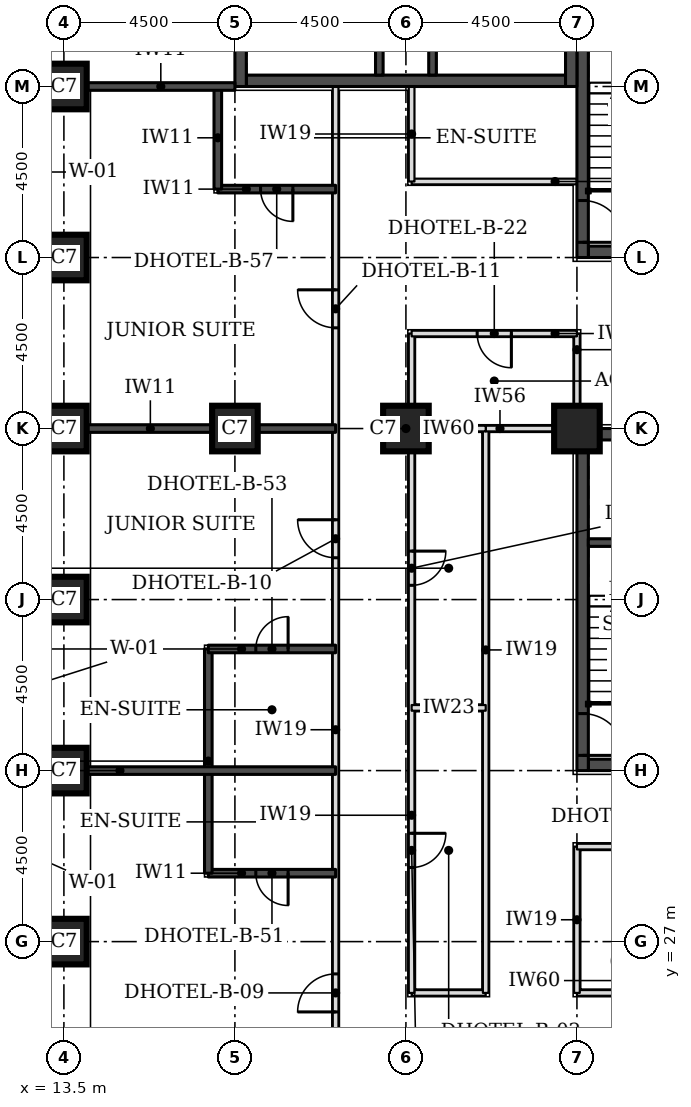
"""IFC4 building model, lengths in metres.
Left out: names, types, materials, properties, quantities, classifications, styles, units other than length and angle.
Written with IfcOpenShell. Run it as: python <this file> out.ifc"""

import sys

from ifc_helpers import new_model, si_unit, direction, frame, frame_2d, origin, origin_2d, place, context, subcontext, project, spatial, rectangle, extrude, element, fill, save


model = new_model("IFC4")
c1 = context("Model", 3, precision=1e-05, world=origin(), true_north=direction((0.0, 1.0)))
c2 = subcontext(c1, "Body", "Model", "MODEL_VIEW")
j1 = project(units=[si_unit("LENGTHUNIT", "METRE"), si_unit("PLANEANGLEUNIT", "RADIAN")], contexts=[c1])
p1 = place(None, origin())
s1 = spatial("IfcSite", under=j1, at=p1, CompositionType="ELEMENT")
p2 = place(p1, origin())
s2 = spatial("IfcBuilding", under=s1, at=p2, CompositionType="ELEMENT")
p3 = place(p2, frame((0.0, 0.0, 52.8)))
s3 = spatial("IfcBuildingStorey", under=s2, at=p3, CompositionType="ELEMENT", Elevation=52.8)
for number, where, z_axis, x_axis in (
    (1, (13.5, 27.0, 0.0), (0.0, 0.0, 1.0), (1.0, 0.0, 0.0)),
    (2, (13.5, 31.5, 0.0), (0.0, 0.0, 1.0), (1.0, 0.0, 0.0)),
    (3, (13.5, 36.0, 0.0), (0.0, 0.0, 1.0), (1.0, 0.0, 0.0)),
    (4, (13.5, 40.5, 0.0), (0.0, 0.0, 1.0), (1.0, 0.0, 0.0)),
    (5, (18.0, 40.5, 0.0), (0.0, 0.0, 1.0), (1.0, 0.0, 0.0)),
    (6, (22.5, 40.5, 0.0), (0.0, 0.0, 1.0), (1.0, 0.0, 0.0)),
    (7, (27.0, 40.5, 0.0), (0.0, 0.0, 1.0), (1.0, 0.0, 0.0)),
    (8, (13.5, 45.0, 0.0), (0.0, 0.0, 1.0), (1.0, 0.0, 0.0)),
    (9, (13.5, 49.5, 0.0), (0.0, 0.0, 1.0), (1.0, 0.0, 0.0)),
):
    element("IfcColumn", number, at=place(p3, frame(where, z_axis=z_axis, x_axis=x_axis)), inside=s3, PredefinedType="COLUMN", context=c2, shape_type="SweptSolid", body=[
        extrude(rectangle(XDim=1.2, YDim=1.2, at=origin_2d()), origin(), (0.0, 0.0, 1.0), 3.3),
    ])
p4 = place(p3, frame((27.3, 45.15, 0.0), z_axis=(0.0, 0.0, 1.0), x_axis=(1.0, 0.0, 0.0)))
e10 = element("IfcWall", 10, at=p4, inside=s3, PredefinedType="SHEAR", context=c2, shape_type="SweptSolid", body=[
    extrude(rectangle(XDim=8.4, YDim=0.3, at=frame_2d((4.2, 0.0))), origin(), (0.0, 0.0, 1.0), 3.3),
])
p5 = place(p4, frame((5.2, 0.0, 0.0)))
e11 = element("IfcOpeningElement", 11, at=p5, cuts=e10, PredefinedType="OPENING", context=c2, shape_type="SweptSolid", body=[
    extrude(rectangle(XDim=1.0, YDim=2.1, at=frame_2d((0.5, 1.05))), frame((0.0, 0.16, 0.0), z_axis=(0.0, -1.0, 0.0), x_axis=(1.0, 0.0, 0.0)), (0.0, 0.0, 1.0), 0.32),
])
p6 = place(p3, frame((27.15, 45.0, 0.0), z_axis=(0.0, 0.0, 1.0), x_axis=(0.0, 1.0, 0.0)))
e12 = element("IfcWall", 12, at=p6, inside=s3, PredefinedType="SHEAR", context=c2, shape_type="SweptSolid", body=[
    extrude(rectangle(XDim=9.0, YDim=0.3, at=frame_2d((4.5, 0.0))), origin(), (0.0, 0.0, 1.0), 3.3),
])
p7 = place(p6, frame((0.4, 0.0, 0.0)))
e13 = element("IfcOpeningElement", 13, at=p7, cuts=e12, PredefinedType="OPENING", context=c2, shape_type="SweptSolid", body=[
    extrude(rectangle(XDim=1.1, YDim=2.1, at=frame_2d((0.55, 1.05))), frame((0.0, 0.16, 0.0), z_axis=(0.0, -1.0, 0.0), x_axis=(1.0, 0.0, 0.0)), (0.0, 0.0, 1.0), 0.32),
])
p8 = place(p3, frame((27.3, 31.65, 0.0), z_axis=(0.0, 0.0, 1.0), x_axis=(1.0, 0.0, 0.0)))
e14 = element("IfcWall", 14, at=p8, inside=s3, PredefinedType="SHEAR", context=c2, shape_type="SweptSolid", body=[
    extrude(rectangle(XDim=8.4, YDim=0.3, at=frame_2d((4.2, 0.0))), origin(), (0.0, 0.0, 1.0), 3.3),
])
p9 = place(p8, frame((4.8, 0.0, 0.0)))
e15 = element("IfcOpeningElement", 15, at=p9, cuts=e14, PredefinedType="OPENING", context=c2, shape_type="SweptSolid", body=[
    extrude(rectangle(XDim=1.8, YDim=2.1, at=frame_2d((0.9, 1.05))), frame((0.0, 0.16, 0.0), z_axis=(0.0, -1.0, 0.0), x_axis=(1.0, 0.0, 0.0)), (0.0, 0.0, 1.0), 0.32),
])
p10 = place(p3, frame((27.3, 40.35, 0.0), z_axis=(0.0, 0.0, 1.0), x_axis=(1.0, 0.0, 0.0)))
e16 = element("IfcWall", 16, at=p10, inside=s3, PredefinedType="SHEAR", context=c2, shape_type="SweptSolid", body=[
    extrude(rectangle(XDim=8.4, YDim=0.3, at=frame_2d((4.2, 0.0))), origin(), (0.0, 0.0, 1.0), 3.3),
])
p11 = place(p10, frame((6.4, 0.0, 0.0)))
e17 = element("IfcOpeningElement", 17, at=p11, cuts=e16, PredefinedType="OPENING", context=c2, shape_type="SweptSolid", body=[
    extrude(rectangle(XDim=1.1, YDim=2.1, at=frame_2d((0.55, 1.05))), frame((0.0, 0.16, 0.0), z_axis=(0.0, -1.0, 0.0), x_axis=(1.0, 0.0, 0.0)), (0.0, 0.0, 1.0), 0.32),
])
p12 = place(p3, frame((27.15, 31.5, 0.0), z_axis=(0.0, 0.0, 1.0), x_axis=(0.0, 1.0, 0.0)))
e18 = element("IfcWall", 18, at=p12, inside=s3, PredefinedType="SHEAR", context=c2, shape_type="SweptSolid", body=[
    extrude(rectangle(XDim=9.0, YDim=0.3, at=frame_2d((4.5, 0.0))), origin(), (0.0, 0.0, 1.0), 3.3),
])
p13 = place(p12, frame((0.4, 0.0, 0.0)))
e19 = element("IfcOpeningElement", 19, at=p13, cuts=e18, PredefinedType="OPENING", context=c2, shape_type="SweptSolid", body=[
    extrude(rectangle(XDim=1.1, YDim=2.1, at=frame_2d((0.55, 1.05))), frame((0.0, 0.16, 0.0), z_axis=(0.0, -1.0, 0.0), x_axis=(1.0, 0.0, 0.0)), (0.0, 0.0, 1.0), 0.32),
])
p14 = place(p3, frame((18.3, 49.65, 0.0), z_axis=(0.0, 0.0, 1.0), x_axis=(1.0, 0.0, 0.0)))
e20 = element("IfcWall", 20, at=p14, inside=s3, PredefinedType="SHEAR", context=c2, shape_type="SweptSolid", body=[
    extrude(rectangle(XDim=8.4, YDim=0.3, at=frame_2d((4.2, 0.0))), origin(), (0.0, 0.0, 1.0), 3.3),
])
for number, where, z_axis, x_axis in (
    (21, (18.15, 49.5, 0.0), (0.0, 0.0, 1.0), (0.0, 1.0, 0.0)),
    (22, (26.85, 49.5, 0.0), (0.0, 0.0, 1.0), (0.0, 1.0, 0.0)),
):
    element("IfcWall", number, at=place(p3, frame(where, z_axis=z_axis, x_axis=x_axis)), inside=s3, PredefinedType="SHEAR", context=c2, shape_type="SweptSolid", body=[
        extrude(rectangle(XDim=9.0, YDim=0.3, at=frame_2d((4.5, 0.0))), origin(), (0.0, 0.0, 1.0), 3.3),
    ])
p15 = place(p3, frame((20.65, 23.65, 0.0), z_axis=(0.0, 0.0, 1.0), x_axis=(0.0, 1.0, 0.0)))
e23 = element("IfcWall", 23, at=p15, inside=s3, PredefinedType="PARTITIONING", context=c2, shape_type="SweptSolid", body=[
    extrude(rectangle(XDim=25.85, YDim=0.15, at=frame_2d((12.925, 0.0))), origin(), (0.0, 0.0, 1.0), 3.08),
])
p16 = place(p15, frame((1.5, 0.0, 0.0)))
e24 = element("IfcOpeningElement", 24, at=p16, cuts=e23, PredefinedType="OPENING", context=c2, shape_type="SweptSolid", body=[
    extrude(rectangle(XDim=1.0, YDim=2.1, at=frame_2d((0.5, 1.05))), frame((0.0, 0.085, 0.0), z_axis=(0.0, -1.0, 0.0), x_axis=(1.0, 0.0, 0.0)), (0.0, 0.0, 1.0), 0.17),
])
p17 = place(p15, frame((13.45, 0.0, 0.0)))
e25 = element("IfcOpeningElement", 25, at=p17, cuts=e23, PredefinedType="OPENING", context=c2, shape_type="SweptSolid", body=[
    extrude(rectangle(XDim=1.0, YDim=2.1, at=frame_2d((0.5, 1.05))), frame((0.0, 0.085, 0.0), z_axis=(0.0, -1.0, 0.0), x_axis=(1.0, 0.0, 0.0)), (0.0, 0.0, 1.0), 0.17),
])
p18 = place(p15, frame((19.5, 0.0, 0.0)))
e26 = element("IfcOpeningElement", 26, at=p18, cuts=e23, PredefinedType="OPENING", context=c2, shape_type="SweptSolid", body=[
    extrude(rectangle(XDim=1.0, YDim=2.1, at=frame_2d((0.5, 1.05))), frame((0.0, 0.085, 0.0), z_axis=(0.0, -1.0, 0.0), x_axis=(1.0, 0.0, 0.0)), (0.0, 0.0, 1.0), 0.17),
])
p19 = place(p3, frame((22.65, 25.65, 0.0), z_axis=(0.0, 0.0, 1.0), x_axis=(1.0, 0.0, 0.0)))
e27 = element("IfcWall", 27, at=p19, inside=s3, PredefinedType="PARTITIONING", context=c2, shape_type="SweptSolid", body=[
    extrude(rectangle(XDim=1.95, YDim=0.15, at=frame_2d((0.975, 0.0))), origin(), (0.0, 0.0, 1.0), 3.08),
])
p20 = place(p3, frame((22.65, 25.65, 0.0), z_axis=(0.0, 0.0, 1.0), x_axis=(0.0, 1.0, 0.0)))
e28 = element("IfcWall", 28, at=p20, inside=s3, PredefinedType="PARTITIONING", context=c2, shape_type="SweptSolid", body=[
    extrude(rectangle(XDim=17.35, YDim=0.15, at=frame_2d((8.675, 0.0))), origin(), (0.0, 0.0, 1.0), 3.08),
])
p21 = place(p20, frame((3.3, 0.0, 0.0)))
e29 = element("IfcOpeningElement", 29, at=p21, cuts=e28, PredefinedType="OPENING", context=c2, shape_type="SweptSolid", body=[
    extrude(rectangle(XDim=0.9, YDim=2.1, at=frame_2d((0.45, 1.05))), frame((0.0, 0.085, 0.0), z_axis=(0.0, -1.0, 0.0), x_axis=(1.0, 0.0, 0.0)), (0.0, 0.0, 1.0), 0.17),
])
p22 = place(p20, frame((10.725, 0.0, 0.0)))
e30 = element("IfcOpeningElement", 30, at=p22, cuts=e28, PredefinedType="OPENING", context=c2, shape_type="SweptSolid", body=[
    extrude(rectangle(XDim=0.9, YDim=2.1, at=frame_2d((0.45, 1.05))), frame((0.0, 0.085, 0.0), z_axis=(0.0, -1.0, 0.0), x_axis=(1.0, 0.0, 0.0)), (0.0, 0.0, 1.0), 0.17),
])
p23 = place(p3, frame((24.6, 25.65, 0.0), z_axis=(0.0, 0.0, 1.0), x_axis=(0.0, 1.0, 0.0)))
e31 = element("IfcWall", 31, at=p23, inside=s3, PredefinedType="PARTITIONING", context=c2, shape_type="SweptSolid", body=[
    extrude(rectangle(XDim=14.85, YDim=0.15, at=frame_2d((7.425, 0.0))), origin(), (0.0, 0.0, 1.0), 3.08),
])
p24 = place(p3, frame((27.0, 25.65, 0.0), z_axis=(0.0, 0.0, 1.0), x_axis=(1.0, 0.0, 0.0)))
e32 = element("IfcWall", 32, at=p24, inside=s3, PredefinedType="PARTITIONING", context=c2, shape_type="SweptSolid", body=[
    extrude(rectangle(XDim=11.5, YDim=0.15, at=frame_2d((5.75, 0.0))), origin(), (0.0, 0.0, 1.0), 3.08),
])
p25 = place(p3, frame((27.0, 25.65, 0.0), z_axis=(0.0, 0.0, 1.0), x_axis=(0.0, 1.0, 0.0)))
e33 = element("IfcWall", 33, at=p25, inside=s3, PredefinedType="PARTITIONING", context=c2, shape_type="SweptSolid", body=[
    extrude(rectangle(XDim=3.85, YDim=0.15, at=frame_2d((1.925, 0.0))), origin(), (0.0, 0.0, 1.0), 3.08),
])
p26 = place(p3, frame((27.0, 29.5, 0.0), z_axis=(0.0, 0.0, 1.0), x_axis=(1.0, 0.0, 0.0)))
e34 = element("IfcWall", 34, at=p26, inside=s3, PredefinedType="PARTITIONING", context=c2, shape_type="SweptSolid", body=[
    extrude(rectangle(XDim=9.0, YDim=0.15, at=frame_2d((4.5, 0.0))), origin(), (0.0, 0.0, 1.0), 3.08),
])
p27 = place(p26, frame((4.05, 0.0, 0.0)))
e35 = element("IfcOpeningElement", 35, at=p27, cuts=e34, PredefinedType="OPENING", context=c2, shape_type="SweptSolid", body=[
    extrude(rectangle(XDim=0.9, YDim=2.1, at=frame_2d((0.45, 1.05))), frame((0.0, 0.085, 0.0), z_axis=(0.0, -1.0, 0.0), x_axis=(1.0, 0.0, 0.0)), (0.0, 0.0, 1.0), 0.17),
])
p28 = place(p3, frame((24.6, 40.5, 0.0), z_axis=(0.0, 0.0, 1.0), x_axis=(1.0, 0.0, 0.0)))
e36 = element("IfcWall", 36, at=p28, inside=s3, PredefinedType="PARTITIONING", context=c2, shape_type="SweptSolid", body=[
    extrude(rectangle(XDim=2.35, YDim=0.15, at=frame_2d((1.175, 0.0))), origin(), (0.0, 0.0, 1.0), 2.33),
])
p29 = place(p3, frame((27.0, 40.55, 0.0), z_axis=(0.0, 0.0, 1.0), x_axis=(0.0, 1.0, 0.0)))
e37 = element("IfcWall", 37, at=p29, inside=s3, PredefinedType="PARTITIONING", context=c2, shape_type="SweptSolid", body=[
    extrude(rectangle(XDim=2.45, YDim=0.15, at=frame_2d((1.225, 0.0))), origin(), (0.0, 0.0, 1.0), 3.08),
])
p30 = place(p3, frame((22.65, 43.0, 0.0), z_axis=(0.0, 0.0, 1.0), x_axis=(1.0, 0.0, 0.0)))
e38 = element("IfcWall", 38, at=p30, inside=s3, PredefinedType="PARTITIONING", context=c2, shape_type="SweptSolid", body=[
    extrude(rectangle(XDim=4.35, YDim=0.15, at=frame_2d((2.175, 0.0))), origin(), (0.0, 0.0, 1.0), 3.08),
])
p31 = place(p30, frame((1.725, 0.0, 0.0)))
e39 = element("IfcOpeningElement", 39, at=p31, cuts=e38, PredefinedType="OPENING", context=c2, shape_type="SweptSolid", body=[
    extrude(rectangle(XDim=0.9, YDim=2.1, at=frame_2d((0.45, 1.05))), frame((0.0, 0.085, 0.0), z_axis=(0.0, -1.0, 0.0), x_axis=(1.0, 0.0, 0.0)), (0.0, 0.0, 1.0), 0.17),
])
p32 = place(p3, frame((22.65, 47.0, 0.0), z_axis=(0.0, 0.0, 1.0), x_axis=(1.0, 0.0, 0.0)))
e40 = element("IfcWall", 40, at=p32, inside=s3, PredefinedType="PARTITIONING", context=c2, shape_type="SweptSolid", body=[
    extrude(rectangle(XDim=4.35, YDim=0.15, at=frame_2d((2.175, 0.0))), origin(), (0.0, 0.0, 1.0), 3.08),
])
p33 = place(p3, frame((22.65, 47.0, 0.0), z_axis=(0.0, 0.0, 1.0), x_axis=(0.0, 1.0, 0.0)))
e41 = element("IfcWall", 41, at=p33, inside=s3, PredefinedType="PARTITIONING", context=c2, shape_type="SweptSolid", body=[
    extrude(rectangle(XDim=2.5, YDim=0.15, at=frame_2d((1.25, 0.0))), origin(), (0.0, 0.0, 1.0), 3.08),
])
p34 = place(p3, frame((17.3, 28.8, 0.0), z_axis=(0.0, 0.0, 1.0), x_axis=(1.0, 0.0, 0.0)))
e42 = element("IfcWall", 42, at=p34, inside=s3, PredefinedType="SOLIDWALL", context=c2, shape_type="SweptSolid", body=[
    extrude(rectangle(XDim=3.35, YDim=0.2, at=frame_2d((1.675, 0.0))), origin(), (0.0, 0.0, 1.0), 3.08),
])
p35 = place(p34, frame((1.25, 0.0, 0.0)))
e43 = element("IfcOpeningElement", 43, at=p35, cuts=e42, PredefinedType="OPENING", context=c2, shape_type="SweptSolid", body=[
    extrude(rectangle(XDim=0.85, YDim=2.1, at=frame_2d((0.425, 1.05))), frame((0.0, 0.11, 0.0), z_axis=(0.0, -1.0, 0.0), x_axis=(1.0, 0.0, 0.0)), (0.0, 0.0, 1.0), 0.22),
])
p36 = place(p3, frame((17.3, 28.8, 0.0), z_axis=(0.0, 0.0, 1.0), x_axis=(0.0, 1.0, 0.0)))
e44 = element("IfcWall", 44, at=p36, inside=s3, PredefinedType="SOLIDWALL", context=c2, shape_type="SweptSolid", body=[
    extrude(rectangle(XDim=5.9, YDim=0.2, at=frame_2d((2.95, 0.0))), origin(), (0.0, 0.0, 1.0), 3.08),
])
p37 = place(p3, frame((14.1, 31.5, 0.0), z_axis=(0.0, 0.0, 1.0), x_axis=(1.0, 0.0, 0.0)))
e45 = element("IfcWall", 45, at=p37, inside=s3, PredefinedType="SOLIDWALL", context=c2, shape_type="SweptSolid", body=[
    extrude(rectangle(XDim=6.55, YDim=0.2, at=frame_2d((3.275, 0.0))), origin(), (0.0, 0.0, 1.0), 3.08),
])
p38 = place(p3, frame((17.3, 34.7, 0.0), z_axis=(0.0, 0.0, 1.0), x_axis=(1.0, 0.0, 0.0)))
e46 = element("IfcWall", 46, at=p38, inside=s3, PredefinedType="SOLIDWALL", context=c2, shape_type="SweptSolid", body=[
    extrude(rectangle(XDim=3.35, YDim=0.2, at=frame_2d((1.675, 0.0))), origin(), (0.0, 0.0, 1.0), 3.08),
])
p39 = place(p38, frame((1.25, 0.0, 0.0)))
e47 = element("IfcOpeningElement", 47, at=p39, cuts=e46, PredefinedType="OPENING", context=c2, shape_type="SweptSolid", body=[
    extrude(rectangle(XDim=0.85, YDim=2.1, at=frame_2d((0.425, 1.05))), frame((0.0, 0.11, 0.0), z_axis=(0.0, -1.0, 0.0), x_axis=(1.0, 0.0, 0.0)), (0.0, 0.0, 1.0), 0.22),
])
p40 = place(p3, frame((14.1, 40.5, 0.0), z_axis=(0.0, 0.0, 1.0), x_axis=(1.0, 0.0, 0.0)))
e48 = element("IfcWall", 48, at=p40, inside=s3, PredefinedType="SOLIDWALL", context=c2, shape_type="SweptSolid", body=[
    extrude(rectangle(XDim=6.55, YDim=0.2, at=frame_2d((3.275, 0.0))), origin(), (0.0, 0.0, 1.0), 3.08),
])
p41 = place(p3, frame((17.55, 46.8, 0.0), z_axis=(0.0, 0.0, 1.0), x_axis=(1.0, 0.0, 0.0)))
e49 = element("IfcWall", 49, at=p41, inside=s3, PredefinedType="SOLIDWALL", context=c2, shape_type="SweptSolid", body=[
    extrude(rectangle(XDim=3.1, YDim=0.2, at=frame_2d((1.55, 0.0))), origin(), (0.0, 0.0, 1.0), 3.08),
])
p42 = place(p41, frame((1.125, 0.0, 0.0)))
e50 = element("IfcOpeningElement", 50, at=p42, cuts=e49, PredefinedType="OPENING", context=c2, shape_type="SweptSolid", body=[
    extrude(rectangle(XDim=0.85, YDim=2.1, at=frame_2d((0.425, 1.05))), frame((0.0, 0.11, 0.0), z_axis=(0.0, -1.0, 0.0), x_axis=(1.0, 0.0, 0.0)), (0.0, 0.0, 1.0), 0.22),
])
p43 = place(p3, frame((17.55, 46.8, 0.0), z_axis=(0.0, 0.0, 1.0), x_axis=(0.0, 1.0, 0.0)))
e51 = element("IfcWall", 51, at=p43, inside=s3, PredefinedType="SOLIDWALL", context=c2, shape_type="SweptSolid", body=[
    extrude(rectangle(XDim=2.7, YDim=0.2, at=frame_2d((1.35, 0.0))), origin(), (0.0, 0.0, 1.0), 3.08),
])
p44 = place(p3, frame((14.1, 49.5, 0.0), z_axis=(0.0, 0.0, 1.0), x_axis=(1.0, 0.0, 0.0)))
e52 = element("IfcWall", 52, at=p44, inside=s3, PredefinedType="SOLIDWALL", context=c2, shape_type="SweptSolid", body=[
    extrude(rectangle(XDim=3.9, YDim=0.2, at=frame_2d((1.95, 0.0))), origin(), (0.0, 0.0, 1.0), 3.08),
])
p45 = place(p3, frame((22.65, 33.15, 0.0), z_axis=(0.0, 0.0, 1.0), x_axis=(1.0, 0.0, 0.0)))
e53 = element("IfcWall", 53, at=p45, inside=s3, PredefinedType="PARTITIONING", context=c2, shape_type="SweptSolid", body=[
    extrude(rectangle(XDim=1.95, YDim=0.15, at=frame_2d((0.975, 0.0))), origin(), (0.0, 0.0, 1.0), 3.08),
])
p46 = place(p3, frame((22.65, 40.5, 0.0), z_axis=(0.0, 0.0, 1.0), x_axis=(1.0, 0.0, 0.0)))
e54 = element("IfcWall", 54, at=p46, inside=s3, PredefinedType="PARTITIONING", context=c2, shape_type="SweptSolid", body=[
    extrude(rectangle(XDim=1.95, YDim=0.15, at=frame_2d((0.975, 0.0))), origin(), (0.0, 0.0, 1.0), 2.33),
])
p47 = place(p3, frame((27.3, 37.5, 0.0), z_axis=(0.0, 0.0, 1.0), x_axis=(1.0, 0.0, 0.0)))
e55 = element("IfcWall", 55, at=p47, inside=s3, PredefinedType="SOLIDWALL", context=c2, shape_type="SweptSolid", body=[
    extrude(rectangle(XDim=5.4, YDim=0.2, at=frame_2d((2.7, 0.0))), origin(), (0.0, 0.0, 1.0), 3.08),
])
for number, where, z_axis, x_axis in (
    (56, (21.8, 49.8, 0.0), (0.0, 0.0, 1.0), (0.0, 1.0, 0.0)),
    (57, (23.2, 49.8, 0.0), (0.0, 0.0, 1.0), (0.0, 1.0, 0.0)),
):
    element("IfcWall", number, at=place(p3, frame(where, z_axis=z_axis, x_axis=x_axis)), inside=s3, PredefinedType="SOLIDWALL", context=c2, shape_type="SweptSolid", body=[
        extrude(rectangle(XDim=6.05, YDim=0.2, at=frame_2d((3.025, 0.0))), origin(), (0.0, 0.0, 1.0), 3.08),
    ])
p48 = place(p16, origin())
e58 = element("IfcDoor", 58, at=p48, inside=s3, OperationType="SINGLE_SWING_LEFT", PredefinedType="DOOR", context=c2, shape_type="SweptSolid", body=[
    extrude(rectangle(XDim=1.0, YDim=2.1, at=frame_2d((0.5, 1.05))), frame((0.0, 0.025, 0.0), z_axis=(0.0, -1.0, 0.0), x_axis=(1.0, 0.0, 0.0)), (0.0, 0.0, 1.0), 0.05),
])
fill(e24, e58)
p49 = place(p35, frame((0.85, 0.0, 0.0), z_axis=(0.0, 0.0, 1.0), x_axis=(-1.0, 0.0, 0.0)))
e59 = element("IfcDoor", 59, at=p49, inside=s3, OperationType="SINGLE_SWING_LEFT", PredefinedType="DOOR", context=c2, shape_type="SweptSolid", body=[
    extrude(rectangle(XDim=0.85, YDim=2.1, at=frame_2d((0.425, 1.05))), frame((0.0, 0.025, 0.0), z_axis=(0.0, -1.0, 0.0), x_axis=(1.0, 0.0, 0.0)), (0.0, 0.0, 1.0), 0.05),
])
fill(e43, e59)
p50 = place(p17, origin())
e60 = element("IfcDoor", 60, at=p50, inside=s3, OperationType="SINGLE_SWING_RIGHT", PredefinedType="DOOR", context=c2, shape_type="SweptSolid", body=[
    extrude(rectangle(XDim=1.0, YDim=2.1, at=frame_2d((0.5, 1.05))), frame((0.0, 0.025, 0.0), z_axis=(0.0, -1.0, 0.0), x_axis=(1.0, 0.0, 0.0)), (0.0, 0.0, 1.0), 0.05),
])
fill(e25, e60)
p51 = place(p39, origin())
e61 = element("IfcDoor", 61, at=p51, inside=s3, OperationType="SINGLE_SWING_RIGHT", PredefinedType="DOOR", context=c2, shape_type="SweptSolid", body=[
    extrude(rectangle(XDim=0.85, YDim=2.1, at=frame_2d((0.425, 1.05))), frame((0.0, 0.025, 0.0), z_axis=(0.0, -1.0, 0.0), x_axis=(1.0, 0.0, 0.0)), (0.0, 0.0, 1.0), 0.05),
])
fill(e47, e61)
p52 = place(p18, origin())
e62 = element("IfcDoor", 62, at=p52, inside=s3, OperationType="SINGLE_SWING_RIGHT", PredefinedType="DOOR", context=c2, shape_type="SweptSolid", body=[
    extrude(rectangle(XDim=1.0, YDim=2.1, at=frame_2d((0.5, 1.05))), frame((0.0, 0.025, 0.0), z_axis=(0.0, -1.0, 0.0), x_axis=(1.0, 0.0, 0.0)), (0.0, 0.0, 1.0), 0.05),
])
fill(e26, e62)
p53 = place(p42, frame((0.85, 0.0, 0.0), z_axis=(0.0, 0.0, 1.0), x_axis=(-1.0, 0.0, 0.0)))
e63 = element("IfcDoor", 63, at=p53, inside=s3, OperationType="SINGLE_SWING_LEFT", PredefinedType="DOOR", context=c2, shape_type="SweptSolid", body=[
    extrude(rectangle(XDim=0.85, YDim=2.1, at=frame_2d((0.425, 1.05))), frame((0.0, 0.025, 0.0), z_axis=(0.0, -1.0, 0.0), x_axis=(1.0, 0.0, 0.0)), (0.0, 0.0, 1.0), 0.05),
])
fill(e50, e63)
p54 = place(p21, frame((0.9, 0.0, 0.0), z_axis=(0.0, 0.0, 1.0), x_axis=(-1.0, 0.0, 0.0)))
e64 = element("IfcDoor", 64, at=p54, inside=s3, OperationType="SINGLE_SWING_LEFT", PredefinedType="DOOR", context=c2, shape_type="SweptSolid", body=[
    extrude(rectangle(XDim=0.9, YDim=2.1, at=frame_2d((0.45, 1.05))), frame((0.0, 0.025, 0.0), z_axis=(0.0, -1.0, 0.0), x_axis=(1.0, 0.0, 0.0)), (0.0, 0.0, 1.0), 0.05),
])
fill(e29, e64)
p55 = place(p22, frame((0.9, 0.0, 0.0), z_axis=(0.0, 0.0, 1.0), x_axis=(-1.0, 0.0, 0.0)))
e65 = element("IfcDoor", 65, at=p55, inside=s3, OperationType="SINGLE_SWING_LEFT", PredefinedType="DOOR", context=c2, shape_type="SweptSolid", body=[
    extrude(rectangle(XDim=0.9, YDim=2.1, at=frame_2d((0.45, 1.05))), frame((0.0, 0.025, 0.0), z_axis=(0.0, -1.0, 0.0), x_axis=(1.0, 0.0, 0.0)), (0.0, 0.0, 1.0), 0.05),
])
fill(e30, e65)
p56 = place(p31, frame((0.9, 0.0, 0.0), z_axis=(0.0, 0.0, 1.0), x_axis=(-1.0, 0.0, 0.0)))
e66 = element("IfcDoor", 66, at=p56, inside=s3, OperationType="SINGLE_SWING_LEFT", PredefinedType="DOOR", context=c2, shape_type="SweptSolid", body=[
    extrude(rectangle(XDim=0.9, YDim=2.1, at=frame_2d((0.45, 1.05))), frame((0.0, 0.025, 0.0), z_axis=(0.0, -1.0, 0.0), x_axis=(1.0, 0.0, 0.0)), (0.0, 0.0, 1.0), 0.05),
])
fill(e39, e66)
p57 = place(p7, frame((1.1, 0.0, 0.0), z_axis=(0.0, 0.0, 1.0), x_axis=(-1.0, 0.0, 0.0)))
e67 = element("IfcDoor", 67, at=p57, inside=s3, OperationType="SINGLE_SWING_RIGHT", PredefinedType="DOOR", context=c2, shape_type="SweptSolid", body=[
    extrude(rectangle(XDim=1.1, YDim=2.1, at=frame_2d((0.55, 1.05))), frame((0.0, 0.025, 0.0), z_axis=(0.0, -1.0, 0.0), x_axis=(1.0, 0.0, 0.0)), (0.0, 0.0, 1.0), 0.05),
])
fill(e13, e67)
p58 = place(p13, frame((1.1, 0.0, 0.0), z_axis=(0.0, 0.0, 1.0), x_axis=(-1.0, 0.0, 0.0)))
e68 = element("IfcDoor", 68, at=p58, inside=s3, OperationType="SINGLE_SWING_RIGHT", PredefinedType="DOOR", context=c2, shape_type="SweptSolid", body=[
    extrude(rectangle(XDim=1.1, YDim=2.1, at=frame_2d((0.55, 1.05))), frame((0.0, 0.025, 0.0), z_axis=(0.0, -1.0, 0.0), x_axis=(1.0, 0.0, 0.0)), (0.0, 0.0, 1.0), 0.05),
])
fill(e19, e68)
save(model, sys.argv[1])
